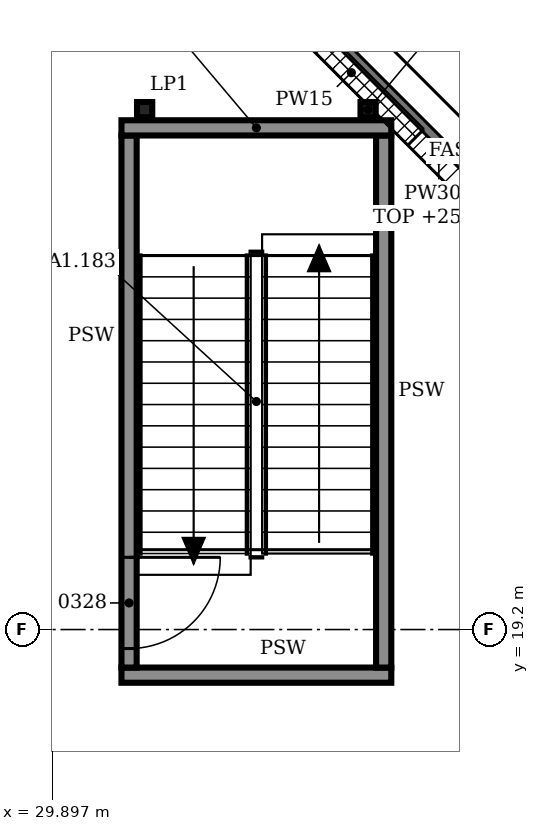
"""IFC4 building model, lengths in metres.
Left out: names, types, materials, properties, quantities, classifications, styles, units other than length and angle.
Written with IfcOpenShell. Run it as: python <this file> out.ifc"""

import sys

from ifc_helpers import new_model, si_unit, direction, frame, frame_2d, origin, origin_2d, place, context, subcontext, project, spatial, rectangle, i_section, extrude, element, fill, save


model = new_model("IFC4")
c1 = context("Model", 3, precision=1e-05, world=origin(), true_north=direction((0.0, 1.0)))
c2 = subcontext(c1, "Body", "Model", "MODEL_VIEW")
j1 = project(units=[si_unit("LENGTHUNIT", "METRE"), si_unit("PLANEANGLEUNIT", "RADIAN")], contexts=[c1])
p1 = place(None, origin())
s1 = spatial("IfcSite", under=j1, at=p1, CompositionType="ELEMENT")
p2 = place(p1, origin())
s2 = spatial("IfcBuilding", under=s1, at=p2, CompositionType="ELEMENT")
p3 = place(p2, frame((0.0, 0.0, 21.0)))
s3 = spatial("IfcBuildingStorey", under=s2, at=p3, CompositionType="ELEMENT", Elevation=21.0)
for number, where, z_axis, x_axis in (
    (1, (31.105, 26.04, 0.0), (0.0, 0.0, 1.0), (1.0, 0.0, 0.0)),
    (2, (34.045, 26.04, 0.0), (0.0, 0.0, 1.0), (1.0, 0.0, 0.0)),
):
    element("IfcColumn", number, at=place(p3, frame(where, z_axis=z_axis, x_axis=x_axis)), inside=s3, PredefinedType="COLUMN", context=c2, shape_type="SweptSolid", body=[
        extrude(i_section(OverallWidth=0.2, OverallDepth=0.2, WebThickness=0.009, FlangeThickness=0.015, FilletRadius=0.018, at=origin_2d()), origin(), (0.0, 0.0, 1.0), 4.8),
    ])
p4 = place(p3, frame((37.277, 23.075, 0.0), z_axis=(0.0, 0.0, 1.0), x_axis=(-0.707088024292, 0.707125537583, 0.0)))
e3 = element("IfcWall", 3, at=p4, inside=s3, PredefinedType="SOLIDWALL", context=c2, shape_type="SweptSolid", body=[
    extrude(rectangle(XDim=6.508, YDim=0.3, at=frame_2d((3.254, 0.0))), origin(), (0.0, 0.0, 1.0), 4.0),
])
p5 = place(p4, frame((0.427, 0.0, 0.9)))
e4 = element("IfcOpeningElement", 4, at=p5, cuts=e3, PredefinedType="OPENING", context=c2, shape_type="SweptSolid", body=[
    extrude(rectangle(XDim=2.4, YDim=1.5, at=frame_2d((1.2, 0.75))), frame((0.0, 0.16, 0.0), z_axis=(0.0, -1.0, 0.0), x_axis=(1.0, 0.0, 0.0)), (0.0, 0.0, 1.0), 0.32),
])
p6 = place(p4, frame((3.681, 0.0, 0.9)))
e5 = element("IfcOpeningElement", 5, at=p6, cuts=e3, PredefinedType="OPENING", context=c2, shape_type="SweptSolid", body=[
    extrude(rectangle(XDim=2.4, YDim=1.5, at=frame_2d((1.2, 0.75))), frame((0.0, 0.16, 0.0), z_axis=(0.0, -1.0, 0.0), x_axis=(1.0, 0.0, 0.0)), (0.0, 0.0, 1.0), 0.32),
])
p7 = place(p3, frame((30.8, 18.6, 0.0), z_axis=(0.0, 0.0, 1.0), x_axis=(1.0, 0.0, 0.0)))
e6 = element("IfcWall", 6, at=p7, inside=s3, PredefinedType="SOLIDWALL", context=c2, shape_type="SweptSolid", body=[
    extrude(rectangle(XDim=3.55, YDim=0.2, at=frame_2d((1.775, 0.0))), origin(), (0.0, 0.0, 1.0), 4.6),
])
p8 = place(p3, frame((30.9, 18.7, 0.0), z_axis=(0.0, 0.0, 1.0), x_axis=(0.0, 1.0, 0.0)))
e7 = element("IfcWall", 7, at=p8, inside=s3, PredefinedType="SOLIDWALL", context=c2, shape_type="SweptSolid", body=[
    extrude(rectangle(XDim=7.0, YDim=0.2, at=frame_2d((3.5, 0.0))), origin(), (0.0, 0.0, 1.0), 4.6),
])
p9 = place(p8, frame((0.25, 0.0, 0.0)))
e8 = element("IfcOpeningElement", 8, at=p9, cuts=e7, PredefinedType="OPENING", context=c2, shape_type="SweptSolid", body=[
    extrude(rectangle(XDim=1.2, YDim=2.1, at=frame_2d((0.6, 1.05))), frame((0.0, 0.11, 0.0), z_axis=(0.0, -1.0, 0.0), x_axis=(1.0, 0.0, 0.0)), (0.0, 0.0, 1.0), 0.22),
])
p10 = place(p3, frame((34.25, 18.7, 0.0), z_axis=(0.0, 0.0, 1.0), x_axis=(0.0, 1.0, 0.0)))
e9 = element("IfcWall", 9, at=p10, inside=s3, PredefinedType="SOLIDWALL", context=c2, shape_type="SweptSolid", body=[
    extrude(rectangle(XDim=7.0, YDim=0.2, at=frame_2d((3.5, 0.0))), origin(), (0.0, 0.0, 1.0), 4.6),
])
p11 = place(p3, frame((30.8, 25.8, 0.0), z_axis=(0.0, 0.0, 1.0), x_axis=(1.0, 0.0, 0.0)))
e10 = element("IfcWall", 10, at=p11, inside=s3, PredefinedType="SOLIDWALL", context=c2, shape_type="SweptSolid", body=[
    extrude(rectangle(XDim=3.55, YDim=0.2, at=frame_2d((1.775, 0.0))), origin(), (0.0, 0.0, 1.0), 4.6),
])
p12 = place(p6, origin())
e11 = element("IfcWindow", 11, at=p12, inside=s3, PartitioningType="SINGLE_PANEL", PredefinedType="WINDOW", context=c2, shape_type="SweptSolid", body=[
    extrude(rectangle(XDim=2.4, YDim=1.5, at=frame_2d((1.2, 0.75))), frame((0.0, 0.03, 0.0), z_axis=(0.0, -1.0, 0.0), x_axis=(1.0, 0.0, 0.0)), (0.0, 0.0, 1.0), 0.06),
])
fill(e5, e11)
p13 = place(p9, frame((1.2, 0.0, 0.0), z_axis=(0.0, 0.0, 1.0), x_axis=(-1.0, 0.0, 0.0)))
e12 = element("IfcDoor", 12, at=p13, inside=s3, OperationType="SINGLE_SWING_LEFT", PredefinedType="DOOR", context=c2, shape_type="SweptSolid", body=[
    extrude(rectangle(XDim=1.2, YDim=2.1, at=frame_2d((0.6, 1.05))), frame((0.0, 0.025, 0.0), z_axis=(0.0, -1.0, 0.0), x_axis=(1.0, 0.0, 0.0)), (0.0, 0.0, 1.0), 0.05),
])
fill(e8, e12)
save(model, sys.argv[1])
